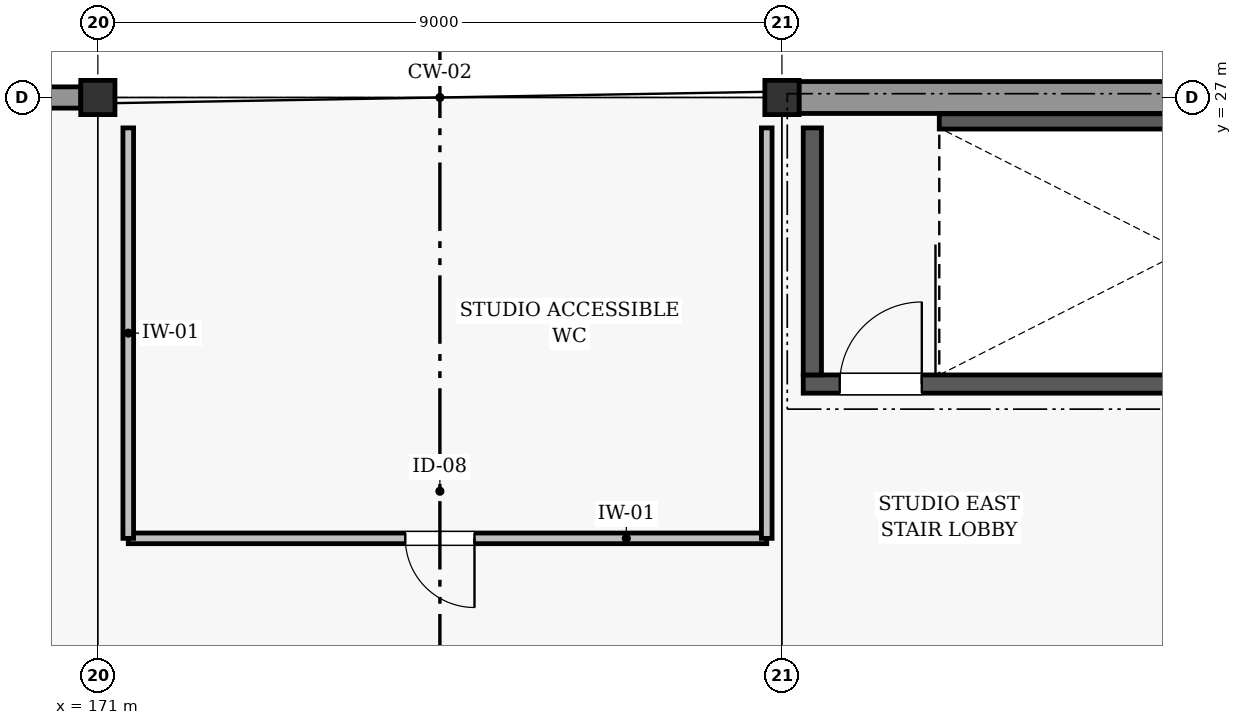
"""IFC4 building model, lengths in metres.
Left out: names, types, materials, properties, quantities, classifications, styles, units other than length and angle.
Written with IfcOpenShell. Run it as: python <this file> out.ifc"""

import sys

from ifc_helpers import new_model, si_unit, direction, frame, frame_2d, origin, origin_2d, place, context, subcontext, project, spatial, rectangle, extrude, element, fill, save


model = new_model("IFC4")
c1 = context("Model", 3, precision=1e-05, world=origin(), true_north=direction((0.0, 1.0)))
c2 = subcontext(c1, "Body", "Model", "MODEL_VIEW")
j1 = project(units=[si_unit("LENGTHUNIT", "METRE"), si_unit("PLANEANGLEUNIT", "RADIAN")], contexts=[c1])
p1 = place(None, origin())
s1 = spatial("IfcSite", under=j1, at=p1, CompositionType="ELEMENT")
p2 = place(p1, origin())
s2 = spatial("IfcBuilding", under=s1, at=p2, CompositionType="ELEMENT")
p3 = place(p2, frame((0.0, 0.0, 8.4)))
s3 = spatial("IfcBuildingStorey", under=s2, at=p3, CompositionType="ELEMENT", Elevation=8.4)
for number, where, z_axis, x_axis in (
    (1, (171.0, 27.0, 0.0), (0.0, 0.0, 1.0), (1.0, 0.0, 0.0)),
    (2, (180.0, 27.0, 0.0), (0.0, 0.0, 1.0), (1.0, 0.0, 0.0)),
):
    element("IfcColumn", number, at=place(p3, frame(where, z_axis=z_axis, x_axis=x_axis)), inside=s3, PredefinedType="COLUMN", context=c2, shape_type="SweptSolid", body=[
        extrude(rectangle(XDim=0.45, YDim=0.45, at=origin_2d()), origin(), (0.0, 0.0, 1.0), 3.6),
    ])
p4 = place(p3, frame((162.223, 27.0, 0.0), z_axis=(0.0, 0.0, 1.0), x_axis=(1.0, 0.0, 0.0)))
e3 = element("IfcWall", 3, at=p4, inside=s3, PredefinedType="SOLIDWALL", context=c2, shape_type="SweptSolid", body=[
    extrude(rectangle(XDim=8.554, YDim=0.28, at=frame_2d((4.277, 0.0))), origin(), (0.0, 0.0, 1.0), 2.892),
])
p5 = place(p4, frame((1.058, 0.0, 0.85)))
e4 = element("IfcOpeningElement", 4, at=p5, cuts=e3, PredefinedType="OPENING", context=c2, shape_type="SweptSolid", body=[
    extrude(rectangle(XDim=1.44, YDim=1.42, at=frame_2d((0.72, 0.71))), frame((0.0, 0.15, 0.0), z_axis=(0.0, -1.0, 0.0), x_axis=(1.0, 0.0, 0.0)), (0.0, 0.0, 1.0), 0.3),
])
p6 = place(p4, frame((3.557, 0.0, 0.85)))
e5 = element("IfcOpeningElement", 5, at=p6, cuts=e3, PredefinedType="OPENING", context=c2, shape_type="SweptSolid", body=[
    extrude(rectangle(XDim=1.44, YDim=1.42, at=frame_2d((0.72, 0.71))), frame((0.0, 0.15, 0.0), z_axis=(0.0, -1.0, 0.0), x_axis=(1.0, 0.0, 0.0)), (0.0, 0.0, 1.0), 0.3),
])
p7 = place(p4, frame((6.055, 0.0, 0.85)))
e6 = element("IfcOpeningElement", 6, at=p7, cuts=e3, PredefinedType="OPENING", context=c2, shape_type="SweptSolid", body=[
    extrude(rectangle(XDim=1.44, YDim=1.42, at=frame_2d((0.72, 0.71))), frame((0.0, 0.15, 0.0), z_axis=(0.0, -1.0, 0.0), x_axis=(1.0, 0.0, 0.0)), (0.0, 0.0, 1.0), 0.3),
])
p8 = place(p3, frame((180.223, 27.0, 0.0), z_axis=(0.0, 0.0, 1.0), x_axis=(1.0, 0.0, 0.0)))
e7 = element("IfcWall", 7, at=p8, inside=s3, PredefinedType="SOLIDWALL", context=c2, shape_type="SweptSolid", body=[
    extrude(rectangle(XDim=8.554, YDim=0.42, at=frame_2d((4.277, 0.0))), origin(), (0.0, 0.0, 1.0), 2.892),
])
p9 = place(p3, frame((180.28, 23.23, 0.0), z_axis=(0.0, 0.0, 1.0), x_axis=(1.0, 0.0, 0.0)))
e8 = element("IfcWall", 8, at=p9, inside=s3, PredefinedType="SHEAR", context=c2, shape_type="SweptSolid", body=[
    extrude(rectangle(XDim=8.44, YDim=0.24, at=frame_2d((4.22, 0.0))), origin(), (0.0, 0.0, 1.0), 3.35),
])
p10 = place(p9, frame((0.48, 0.0, 0.0)))
e9 = element("IfcOpeningElement", 9, at=p10, cuts=e8, PredefinedType="OPENING", context=c2, shape_type="SweptSolid", body=[
    extrude(rectangle(XDim=1.08, YDim=2.08, at=frame_2d((0.54, 1.04))), frame((0.0, 0.13, 0.0), z_axis=(0.0, -1.0, 0.0), x_axis=(1.0, 0.0, 0.0)), (0.0, 0.0, 1.0), 0.26),
])
p11 = place(p3, frame((182.07, 26.685, 0.0), z_axis=(0.0, 0.0, 1.0), x_axis=(1.0, 0.0, 0.0)))
e10 = element("IfcWall", 10, at=p11, inside=s3, PredefinedType="SHEAR", context=c2, shape_type="SweptSolid", body=[
    extrude(rectangle(XDim=6.41, YDim=0.2, at=frame_2d((3.205, 0.0))), origin(), (0.0, 0.0, 1.0), 3.35),
])
p12 = place(p3, frame((180.4, 23.35, 0.0), z_axis=(0.0, 0.0, 1.0), x_axis=(0.0, 1.0, 0.0)))
e11 = element("IfcWall", 11, at=p12, inside=s3, PredefinedType="SHEAR", context=c2, shape_type="SweptSolid", body=[
    extrude(rectangle(XDim=3.25, YDim=0.24, at=frame_2d((1.625, 0.0))), origin(), (0.0, 0.0, 1.0), 3.35),
])
p13 = place(p3, frame((171.4, 21.2, 0.0), z_axis=(0.0, 0.0, 1.0), x_axis=(1.0, 0.0, 0.0)))
e12 = element("IfcWall", 12, at=p13, inside=s3, PredefinedType="PARTITIONING", context=c2, shape_type="SweptSolid", body=[
    extrude(rectangle(XDim=8.4, YDim=0.14, at=frame_2d((4.2, 0.0))), origin(), (0.0, 0.0, 1.0), 2.895),
])
p14 = place(p13, frame((3.645, 0.0, 0.0)))
e13 = element("IfcOpeningElement", 13, at=p14, cuts=e12, PredefinedType="OPENING", context=c2, shape_type="SweptSolid", body=[
    extrude(rectangle(XDim=0.91, YDim=2.04, at=frame_2d((0.455, 1.02))), frame((0.0, 0.08, 0.0), z_axis=(0.0, -1.0, 0.0), x_axis=(1.0, 0.0, 0.0)), (0.0, 0.0, 1.0), 0.16),
])
p15 = place(p3, frame((171.4, 21.2, 0.0), z_axis=(0.0, 0.0, 1.0), x_axis=(0.0, 1.0, 0.0)))
e14 = element("IfcWall", 14, at=p15, inside=s3, PredefinedType="PARTITIONING", context=c2, shape_type="SweptSolid", body=[
    extrude(rectangle(XDim=5.4, YDim=0.14, at=frame_2d((2.7, 0.0))), origin(), (0.0, 0.0, 1.0), 3.35),
])
p16 = place(p3, frame((179.8, 21.2, 0.0), z_axis=(0.0, 0.0, 1.0), x_axis=(0.0, 1.0, 0.0)))
e15 = element("IfcWall", 15, at=p16, inside=s3, PredefinedType="PARTITIONING", context=c2, shape_type="SweptSolid", body=[
    extrude(rectangle(XDim=5.4, YDim=0.14, at=frame_2d((2.7, 0.0))), origin(), (0.0, 0.0, 1.0), 2.895),
])
p17 = place(p10, origin())
e16 = element("IfcDoor", 16, at=p17, inside=s3, OperationType="SINGLE_SWING_RIGHT", PredefinedType="DOOR", context=c2, shape_type="SweptSolid", body=[
    extrude(rectangle(XDim=1.08, YDim=2.08, at=frame_2d((0.54, 1.04))), frame((0.0, 0.025, 0.0), z_axis=(0.0, -1.0, 0.0), x_axis=(1.0, 0.0, 0.0)), (0.0, 0.0, 1.0), 0.05),
])
fill(e9, e16)
p18 = place(p14, frame((0.91, 0.0, 0.0), z_axis=(0.0, 0.0, 1.0), x_axis=(-1.0, 0.0, 0.0)))
e17 = element("IfcDoor", 17, at=p18, inside=s3, OperationType="SINGLE_SWING_RIGHT", PredefinedType="DOOR", context=c2, shape_type="SweptSolid", body=[
    extrude(rectangle(XDim=0.91, YDim=2.04, at=frame_2d((0.455, 1.02))), frame((0.0, 0.025, 0.0), z_axis=(0.0, -1.0, 0.0), x_axis=(1.0, 0.0, 0.0)), (0.0, 0.0, 1.0), 0.05),
])
fill(e13, e17)
save(model, sys.argv[1])
